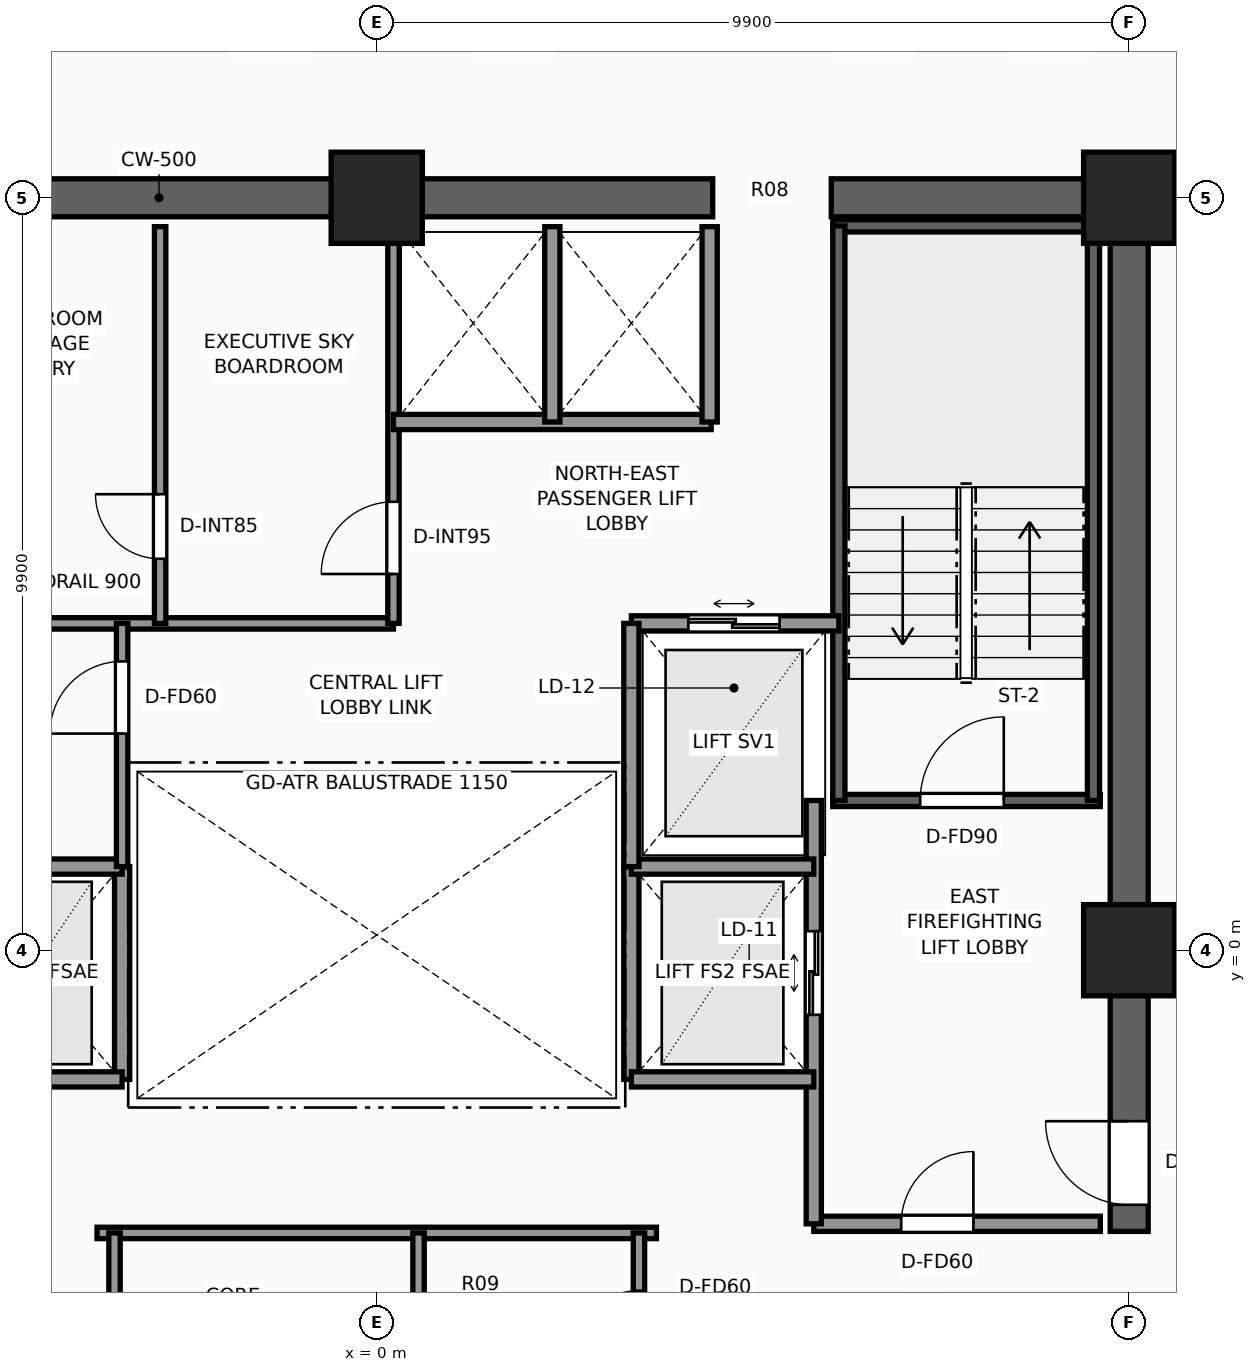
"""IFC4 building model, lengths in metres.
Left out: names, types, materials, properties, quantities, classifications, styles, units other than length and angle.
Written with IfcOpenShell. Run it as: python <this file> out.ifc"""

import sys

from ifc_helpers import new_model, si_unit, direction, frame, frame_2d, origin, origin_2d, place, context, subcontext, project, spatial, rectangle, extrude, element, fill, save


model = new_model("IFC4")
c1 = context("Model", 3, precision=1e-05, world=origin(), true_north=direction((0.0, 1.0)))
c2 = subcontext(c1, "Body", "Model", "MODEL_VIEW")
j1 = project(units=[si_unit("LENGTHUNIT", "METRE"), si_unit("PLANEANGLEUNIT", "RADIAN")], contexts=[c1])
p1 = place(None, origin())
s1 = spatial("IfcSite", under=j1, at=p1, CompositionType="ELEMENT")
p2 = place(p1, origin())
s2 = spatial("IfcBuilding", under=s1, at=p2, CompositionType="ELEMENT")
p3 = place(p2, frame((0.0, 0.0, 121.7)))
s3 = spatial("IfcBuildingStorey", under=s2, at=p3, CompositionType="ELEMENT", Elevation=121.7)
p4 = place(p3, frame((-10.15, 9.9, 0.0), z_axis=(0.0, 0.0, 1.0), x_axis=(1.0, 0.0, 0.0)))
e1 = element("IfcWall", 1, at=p4, inside=s3, PredefinedType="SHEAR", context=c2, shape_type="SweptSolid", body=[
    extrude(rectangle(XDim=14.57, YDim=0.5, at=frame_2d((7.285, 0.0))), origin(), (0.0, 0.0, 1.0), 3.3),
])
p5 = place(p3, frame((5.98, 9.9, 0.0), z_axis=(0.0, 0.0, 1.0), x_axis=(1.0, 0.0, 0.0)))
e2 = element("IfcWall", 2, at=p5, inside=s3, PredefinedType="SHEAR", context=c2, shape_type="SweptSolid", body=[
    extrude(rectangle(XDim=4.17, YDim=0.5, at=frame_2d((2.085, 0.0))), origin(), (0.0, 0.0, 1.0), 3.3),
])
p6 = place(p3, frame((9.9, -3.7, 0.0), z_axis=(0.0, 0.0, 1.0), x_axis=(0.0, 1.0, 0.0)))
e3 = element("IfcWall", 3, at=p6, inside=s3, PredefinedType="SHEAR", context=c2, shape_type="SweptSolid", body=[
    extrude(rectangle(XDim=13.35, YDim=0.5, at=frame_2d((6.675, 0.0))), origin(), (0.0, 0.0, 1.0), 3.3),
])
p7 = place(p6, frame((0.35, 0.0, 0.0)))
e4 = element("IfcOpeningElement", 4, at=p7, cuts=e3, PredefinedType="OPENING", context=c2, shape_type="SweptSolid", body=[
    extrude(rectangle(XDim=1.1, YDim=2.2, at=frame_2d((0.55, 1.1))), frame((0.0, 0.26, 0.0), z_axis=(0.0, -1.0, 0.0), x_axis=(1.0, 0.0, 0.0)), (0.0, 0.0, 1.0), 0.52),
])
for number, where, z_axis, x_axis in (
    (5, (9.9, 9.9, 0.0), (0.0, 0.0, 1.0), (1.0, 0.0, 0.0)),
    (6, (9.9, 0.0, 0.0), (0.0, 0.0, 1.0), (1.0, 0.0, 0.0)),
    (7, (0.0, 9.9, 0.0), (0.0, 0.0, 1.0), (1.0, 0.0, 0.0)),
):
    element("IfcColumn", number, at=place(p3, frame(where, z_axis=z_axis, x_axis=x_axis)), inside=s3, PredefinedType="COLUMN", context=c2, shape_type="SweptSolid", body=[
        extrude(rectangle(XDim=1.2, YDim=1.2, at=origin_2d()), origin(), (0.0, 0.0, 1.0), 3.3),
    ])
p8 = place(p3, frame((6.0, 1.97, 0.0), z_axis=(0.0, 0.0, 1.0), x_axis=(1.0, 0.0, 0.0)))
e8 = element("IfcWall", 8, at=p8, inside=s3, PredefinedType="SHEAR", context=c2, shape_type="SweptSolid", body=[
    extrude(rectangle(XDim=3.52, YDim=0.16, at=frame_2d((1.76, 0.0))), origin(), (0.0, 0.0, 1.0), 3.3),
])
p9 = place(p8, frame((1.15, 0.0, 0.0)))
e9 = element("IfcOpeningElement", 9, at=p9, cuts=e8, PredefinedType="OPENING", context=c2, shape_type="SweptSolid", body=[
    extrude(rectangle(XDim=1.1, YDim=2.2, at=frame_2d((0.55, 1.1))), frame((0.0, 0.09, 0.0), z_axis=(0.0, -1.0, 0.0), x_axis=(1.0, 0.0, 0.0)), (0.0, 0.0, 1.0), 0.18),
])
p10 = place(p3, frame((6.0, 9.53, 0.0), z_axis=(0.0, 0.0, 1.0), x_axis=(1.0, 0.0, 0.0)))
e10 = element("IfcWall", 10, at=p10, inside=s3, PredefinedType="SHEAR", context=c2, shape_type="SweptSolid", body=[
    extrude(rectangle(XDim=3.52, YDim=0.16, at=frame_2d((1.76, 0.0))), origin(), (0.0, 0.0, 1.0), 3.3),
])
for number, where, z_axis, x_axis in (
    (11, (6.08, 1.97, 0.0), (0.0, 0.0, 1.0), (0.0, 1.0, 0.0)),
    (12, (9.43, 1.97, 0.0), (0.0, 0.0, 1.0), (0.0, 1.0, 0.0)),
):
    element("IfcWall", number, at=place(p3, frame(where, z_axis=z_axis, x_axis=x_axis)), inside=s3, PredefinedType="SHEAR", context=c2, shape_type="SweptSolid", body=[
        extrude(rectangle(XDim=7.56, YDim=0.16, at=frame_2d((3.78, 0.0))), origin(), (0.0, 0.0, 1.0), 3.3),
    ])
p11 = place(p3, frame((-3.35, -1.7, 0.0), z_axis=(0.0, 0.0, 1.0), x_axis=(0.0, 1.0, 0.0)))
e13 = element("IfcWall", 13, at=p11, inside=s3, PredefinedType="SOLIDWALL", context=c2, shape_type="SweptSolid", body=[
    extrude(rectangle(XDim=2.8, YDim=0.2, at=frame_2d((1.4, 0.0))), origin(), (0.0, 0.0, 1.0), 2.715),
])
for number, where, z_axis, x_axis in (
    (14, (-5.75, -1.7, 0.0), (0.0, 0.0, 1.0), (1.0, 0.0, 0.0)),
    (15, (-5.75, 1.1, 0.0), (0.0, 0.0, 1.0), (1.0, 0.0, 0.0)),
):
    element("IfcWall", number, at=place(p3, frame(where, z_axis=z_axis, x_axis=x_axis)), inside=s3, PredefinedType="SOLIDWALL", context=c2, shape_type="SweptSolid", body=[
        extrude(rectangle(XDim=2.4, YDim=0.2, at=frame_2d((1.2, 0.0))), origin(), (0.0, 0.0, 1.0), 3.08),
    ])
p12 = place(p3, frame((5.75, -3.6, 0.0), z_axis=(0.0, 0.0, 1.0), x_axis=(1.0, 0.0, 0.0)))
e16 = element("IfcWall", 16, at=p12, inside=s3, PredefinedType="SOLIDWALL", context=c2, shape_type="SweptSolid", body=[
    extrude(rectangle(XDim=3.77, YDim=0.2, at=frame_2d((1.885, 0.0))), origin(), (0.0, 0.0, 1.0), 3.08),
])
p13 = place(p12, frame((1.15, 0.0, 0.0)))
e17 = element("IfcOpeningElement", 17, at=p13, cuts=e16, PredefinedType="OPENING", context=c2, shape_type="SweptSolid", body=[
    extrude(rectangle(XDim=0.95, YDim=2.06, at=frame_2d((0.475, 1.03))), frame((0.0, 0.11, 0.0), z_axis=(0.0, -1.0, 0.0), x_axis=(1.0, 0.0, 0.0)), (0.0, 0.0, 1.0), 0.22),
])
p14 = place(p3, frame((5.75, -3.6, 0.0), z_axis=(0.0, 0.0, 1.0), x_axis=(0.0, 1.0, 0.0)))
e18 = element("IfcWall", 18, at=p14, inside=s3, PredefinedType="SOLIDWALL", context=c2, shape_type="SweptSolid", body=[
    extrude(rectangle(XDim=5.57, YDim=0.2, at=frame_2d((2.785, 0.0))), origin(), (0.0, 0.0, 1.0), 2.715),
])
p15 = place(p14, frame((2.75, 0.0, 0.0)))
e19 = element("IfcOpeningElement", 19, at=p15, cuts=e18, PredefinedType="OPENING", context=c2, shape_type="SweptSolid", body=[
    extrude(rectangle(XDim=1.1, YDim=2.2, at=frame_2d((0.55, 1.1))), frame((0.0, 0.11, 0.0), z_axis=(0.0, -1.0, 0.0), x_axis=(1.0, 0.0, 0.0)), (0.0, 0.0, 1.0), 0.22),
])
p16 = place(p3, frame((3.35, -1.7, 0.0), z_axis=(0.0, 0.0, 1.0), x_axis=(0.0, 1.0, 0.0)))
e20 = element("IfcWall", 20, at=p16, inside=s3, PredefinedType="SOLIDWALL", context=c2, shape_type="SweptSolid", body=[
    extrude(rectangle(XDim=2.8, YDim=0.2, at=frame_2d((1.4, 0.0))), origin(), (0.0, 0.0, 1.0), 2.715),
])
for number, where, z_axis, x_axis in (
    (21, (3.35, -1.7, 0.0), (0.0, 0.0, 1.0), (1.0, 0.0, 0.0)),
    (22, (3.35, 1.1, 0.0), (0.0, 0.0, 1.0), (1.0, 0.0, 0.0)),
):
    element("IfcWall", number, at=place(p3, frame(where, z_axis=z_axis, x_axis=x_axis)), inside=s3, PredefinedType="SOLIDWALL", context=c2, shape_type="SweptSolid", body=[
        extrude(rectangle(XDim=2.4, YDim=0.2, at=frame_2d((1.2, 0.0))), origin(), (0.0, 0.0, 1.0), 3.08),
    ])
p17 = place(p3, frame((3.35, 4.3, 0.0), z_axis=(0.0, 0.0, 1.0), x_axis=(1.0, 0.0, 0.0)))
e23 = element("IfcWall", 23, at=p17, inside=s3, PredefinedType="SOLIDWALL", context=c2, shape_type="SweptSolid", body=[
    extrude(rectangle(XDim=2.73, YDim=0.2, at=frame_2d((1.365, 0.0))), origin(), (0.0, 0.0, 1.0), 3.08),
])
p18 = place(p17, frame((0.75, 0.0, 0.0)))
e24 = element("IfcOpeningElement", 24, at=p18, cuts=e23, PredefinedType="OPENING", context=c2, shape_type="SweptSolid", body=[
    extrude(rectangle(XDim=1.2, YDim=2.25, at=frame_2d((0.6, 1.125))), frame((0.0, 0.11, 0.0), z_axis=(0.0, -1.0, 0.0), x_axis=(1.0, 0.0, 0.0)), (0.0, 0.0, 1.0), 0.22),
])
p19 = place(p3, frame((3.35, 1.1, 0.0), z_axis=(0.0, 0.0, 1.0), x_axis=(0.0, 1.0, 0.0)))
e25 = element("IfcWall", 25, at=p19, inside=s3, PredefinedType="SOLIDWALL", context=c2, shape_type="SweptSolid", body=[
    extrude(rectangle(XDim=3.2, YDim=0.2, at=frame_2d((1.6, 0.0))), origin(), (0.0, 0.0, 1.0), 2.715),
])
p20 = place(p3, frame((-6.08, 4.3, 0.0), z_axis=(0.0, 0.0, 1.0), x_axis=(1.0, 0.0, 0.0)))
e26 = element("IfcWall", 26, at=p20, inside=s3, PredefinedType="PARTITIONING", context=c2, shape_type="SweptSolid", body=[
    extrude(rectangle(XDim=6.3, YDim=0.15, at=frame_2d((3.15, 0.0))), origin(), (0.0, 0.0, 1.0), 3.08),
])
p21 = place(p3, frame((0.22, 4.3, 0.0), z_axis=(0.0, 0.0, 1.0), x_axis=(0.0, 1.0, 0.0)))
e27 = element("IfcWall", 27, at=p21, inside=s3, PredefinedType="PARTITIONING", context=c2, shape_type="SweptSolid", body=[
    extrude(rectangle(XDim=5.22, YDim=0.15, at=frame_2d((2.61, 0.0))), origin(), (0.0, 0.0, 1.0), 3.08),
])
p22 = place(p21, frame((0.65, 0.0, 0.0)))
e28 = element("IfcOpeningElement", 28, at=p22, cuts=e27, PredefinedType="OPENING", context=c2, shape_type="SweptSolid", body=[
    extrude(rectangle(XDim=0.95, YDim=2.06, at=frame_2d((0.475, 1.03))), frame((0.0, 0.085, 0.0), z_axis=(0.0, -1.0, 0.0), x_axis=(1.0, 0.0, 0.0)), (0.0, 0.0, 1.0), 0.17),
])
p23 = place(p3, frame((-2.85, 4.3, 0.0), z_axis=(0.0, 0.0, 1.0), x_axis=(0.0, 1.0, 0.0)))
e29 = element("IfcWall", 29, at=p23, inside=s3, PredefinedType="PARTITIONING", context=c2, shape_type="SweptSolid", body=[
    extrude(rectangle(XDim=5.22, YDim=0.15, at=frame_2d((2.61, 0.0))), origin(), (0.0, 0.0, 1.0), 3.08),
])
p24 = place(p23, frame((0.85, 0.0, 0.0)))
e30 = element("IfcOpeningElement", 30, at=p24, cuts=e29, PredefinedType="OPENING", context=c2, shape_type="SweptSolid", body=[
    extrude(rectangle(XDim=0.85, YDim=2.03, at=frame_2d((0.425, 1.015))), frame((0.0, 0.085, 0.0), z_axis=(0.0, -1.0, 0.0), x_axis=(1.0, 0.0, 0.0)), (0.0, 0.0, 1.0), 0.17),
])
p25 = place(p3, frame((0.22, 6.95, 0.0), z_axis=(0.0, 0.0, 1.0), x_axis=(1.0, 0.0, 0.0)))
e31 = element("IfcWall", 31, at=p25, inside=s3, PredefinedType="SOLIDWALL", context=c2, shape_type="SweptSolid", body=[
    extrude(rectangle(XDim=4.18, YDim=0.2, at=frame_2d((2.09, 0.0))), origin(), (0.0, 0.0, 1.0), 3.08),
])
for number, where, z_axis, x_axis in (
    (32, (4.38, 6.95, 0.0), (0.0, 0.0, 1.0), (0.0, 1.0, 0.0)),
    (33, (2.31, 6.95, 0.0), (0.0, 0.0, 1.0), (0.0, 1.0, 0.0)),
):
    element("IfcWall", number, at=place(p3, frame(where, z_axis=z_axis, x_axis=x_axis)), inside=s3, PredefinedType="SOLIDWALL", context=c2, shape_type="SweptSolid", body=[
        extrude(rectangle(XDim=2.57, YDim=0.2, at=frame_2d((1.285, 0.0))), origin(), (0.0, 0.0, 1.0), 3.08),
    ])
p26 = place(p3, frame((-3.68, -3.72, 0.0), z_axis=(0.0, 0.0, 1.0), x_axis=(1.0, 0.0, 0.0)))
e34 = element("IfcWall", 34, at=p26, inside=s3, PredefinedType="PARTITIONING", context=c2, shape_type="SweptSolid", body=[
    extrude(rectangle(XDim=7.36, YDim=0.15, at=frame_2d((3.68, 0.0))), origin(), (0.0, 0.0, 1.0), 3.08),
])
p27 = place(p3, frame((3.45, -6.08, 0.0), z_axis=(0.0, 0.0, 1.0), x_axis=(0.0, 1.0, 0.0)))
e35 = element("IfcWall", 35, at=p27, inside=s3, PredefinedType="PARTITIONING", context=c2, shape_type="SweptSolid", body=[
    extrude(rectangle(XDim=2.36, YDim=0.15, at=frame_2d((1.18, 0.0))), origin(), (0.0, 0.0, 1.0), 3.08),
])
p28 = place(p27, frame((0.65, 0.0, 0.0)))
e36 = element("IfcOpeningElement", 36, at=p28, cuts=e35, PredefinedType="OPENING", context=c2, shape_type="SweptSolid", body=[
    extrude(rectangle(XDim=0.95, YDim=2.06, at=frame_2d((0.475, 1.03))), frame((0.0, 0.085, 0.0), z_axis=(0.0, -1.0, 0.0), x_axis=(1.0, 0.0, 0.0)), (0.0, 0.0, 1.0), 0.17),
])
p29 = place(p3, frame((-3.45, -6.08, 0.0), z_axis=(0.0, 0.0, 1.0), x_axis=(0.0, 1.0, 0.0)))
e37 = element("IfcWall", 37, at=p29, inside=s3, PredefinedType="PARTITIONING", context=c2, shape_type="SweptSolid", body=[
    extrude(rectangle(XDim=2.36, YDim=0.15, at=frame_2d((1.18, 0.0))), origin(), (0.0, 0.0, 1.0), 3.08),
])
p30 = place(p3, frame((0.55, -6.08, 0.0), z_axis=(0.0, 0.0, 1.0), x_axis=(0.0, 1.0, 0.0)))
e38 = element("IfcWall", 38, at=p30, inside=s3, PredefinedType="PARTITIONING", context=c2, shape_type="SweptSolid", body=[
    extrude(rectangle(XDim=2.36, YDim=0.15, at=frame_2d((1.18, 0.0))), origin(), (0.0, 0.0, 1.0), 3.08),
])
p31 = place(p30, frame((0.65, 0.0, 0.0)))
e39 = element("IfcOpeningElement", 39, at=p31, cuts=e38, PredefinedType="OPENING", context=c2, shape_type="SweptSolid", body=[
    extrude(rectangle(XDim=0.9, YDim=2.06, at=frame_2d((0.45, 1.03))), frame((0.0, 0.085, 0.0), z_axis=(0.0, -1.0, 0.0), x_axis=(1.0, 0.0, 0.0)), (0.0, 0.0, 1.0), 0.17),
])
p32 = place(p3, frame((-3.35, 1.1, 0.0), z_axis=(0.0, 0.0, 1.0), x_axis=(0.0, 1.0, 0.0)))
e40 = element("IfcWall", 40, at=p32, inside=s3, PredefinedType="PARTITIONING", context=c2, shape_type="SweptSolid", body=[
    extrude(rectangle(XDim=3.2, YDim=0.15, at=frame_2d((1.6, 0.0))), origin(), (0.0, 0.0, 1.0), 2.715),
])
p33 = place(p32, frame((1.75, 0.0, 0.0)))
e41 = element("IfcOpeningElement", 41, at=p33, cuts=e40, PredefinedType="OPENING", context=c2, shape_type="SweptSolid", body=[
    extrude(rectangle(XDim=0.95, YDim=2.06, at=frame_2d((0.475, 1.03))), frame((0.0, 0.085, 0.0), z_axis=(0.0, -1.0, 0.0), x_axis=(1.0, 0.0, 0.0)), (0.0, 0.0, 1.0), 0.17),
])
p34 = place(p9, origin())
e42 = element("IfcDoor", 42, at=p34, inside=s3, OperationType="SINGLE_SWING_RIGHT", PredefinedType="DOOR", context=c2, shape_type="SweptSolid", body=[
    extrude(rectangle(XDim=1.1, YDim=2.2, at=frame_2d((0.55, 1.1))), frame((0.0, 0.025, 0.0), z_axis=(0.0, -1.0, 0.0), x_axis=(1.0, 0.0, 0.0)), (0.0, 0.0, 1.0), 0.05),
])
fill(e9, e42)
p35 = place(p7, origin())
e43 = element("IfcDoor", 43, at=p35, inside=s3, OperationType="SINGLE_SWING_RIGHT", PredefinedType="DOOR", context=c2, shape_type="SweptSolid", body=[
    extrude(rectangle(XDim=1.1, YDim=2.2, at=frame_2d((0.55, 1.1))), frame((0.0, 0.025, 0.0), z_axis=(0.0, -1.0, 0.0), x_axis=(1.0, 0.0, 0.0)), (0.0, 0.0, 1.0), 0.05),
])
fill(e4, e43)
p36 = place(p15, origin())
e44 = element("IfcDoor", 44, at=p36, inside=s3, OperationType="DOUBLE_DOOR_SLIDING", PredefinedType="DOOR", context=c2, shape_type="SweptSolid", body=[
    extrude(rectangle(XDim=1.1, YDim=2.2, at=frame_2d((0.55, 1.1))), frame((0.0, 0.025, 0.0), z_axis=(0.0, -1.0, 0.0), x_axis=(1.0, 0.0, 0.0)), (0.0, 0.0, 1.0), 0.05),
])
fill(e19, e44)
p37 = place(p18, origin())
e45 = element("IfcDoor", 45, at=p37, inside=s3, OperationType="DOUBLE_DOOR_SLIDING", PredefinedType="DOOR", context=c2, shape_type="SweptSolid", body=[
    extrude(rectangle(XDim=1.2, YDim=2.25, at=frame_2d((0.6, 1.125))), frame((0.0, 0.025, 0.0), z_axis=(0.0, -1.0, 0.0), x_axis=(1.0, 0.0, 0.0)), (0.0, 0.0, 1.0), 0.05),
])
fill(e24, e45)
p38 = place(p22, origin())
e46 = element("IfcDoor", 46, at=p38, inside=s3, OperationType="SINGLE_SWING_LEFT", PredefinedType="DOOR", context=c2, shape_type="SweptSolid", body=[
    extrude(rectangle(XDim=0.95, YDim=2.06, at=frame_2d((0.475, 1.03))), frame((0.0, 0.025, 0.0), z_axis=(0.0, -1.0, 0.0), x_axis=(1.0, 0.0, 0.0)), (0.0, 0.0, 1.0), 0.05),
])
fill(e28, e46)
p39 = place(p24, origin())
e47 = element("IfcDoor", 47, at=p39, inside=s3, OperationType="SINGLE_SWING_RIGHT", PredefinedType="DOOR", context=c2, shape_type="SweptSolid", body=[
    extrude(rectangle(XDim=0.85, YDim=2.03, at=frame_2d((0.425, 1.015))), frame((0.0, 0.025, 0.0), z_axis=(0.0, -1.0, 0.0), x_axis=(1.0, 0.0, 0.0)), (0.0, 0.0, 1.0), 0.05),
])
fill(e30, e47)
p40 = place(p13, origin())
e48 = element("IfcDoor", 48, at=p40, inside=s3, OperationType="SINGLE_SWING_RIGHT", PredefinedType="DOOR", context=c2, shape_type="SweptSolid", body=[
    extrude(rectangle(XDim=0.95, YDim=2.06, at=frame_2d((0.475, 1.03))), frame((0.0, 0.025, 0.0), z_axis=(0.0, -1.0, 0.0), x_axis=(1.0, 0.0, 0.0)), (0.0, 0.0, 1.0), 0.05),
])
fill(e17, e48)
p41 = place(p28, origin())
e49 = element("IfcDoor", 49, at=p41, inside=s3, OperationType="SINGLE_SWING_LEFT", PredefinedType="DOOR", context=c2, shape_type="SweptSolid", body=[
    extrude(rectangle(XDim=0.95, YDim=2.06, at=frame_2d((0.475, 1.03))), frame((0.0, 0.025, 0.0), z_axis=(0.0, -1.0, 0.0), x_axis=(1.0, 0.0, 0.0)), (0.0, 0.0, 1.0), 0.05),
])
fill(e36, e49)
p42 = place(p33, origin())
e50 = element("IfcDoor", 50, at=p42, inside=s3, OperationType="SINGLE_SWING_LEFT", PredefinedType="DOOR", context=c2, shape_type="SweptSolid", body=[
    extrude(rectangle(XDim=0.95, YDim=2.06, at=frame_2d((0.475, 1.03))), frame((0.0, 0.025, 0.0), z_axis=(0.0, -1.0, 0.0), x_axis=(1.0, 0.0, 0.0)), (0.0, 0.0, 1.0), 0.05),
])
fill(e41, e50)
save(model, sys.argv[1])
